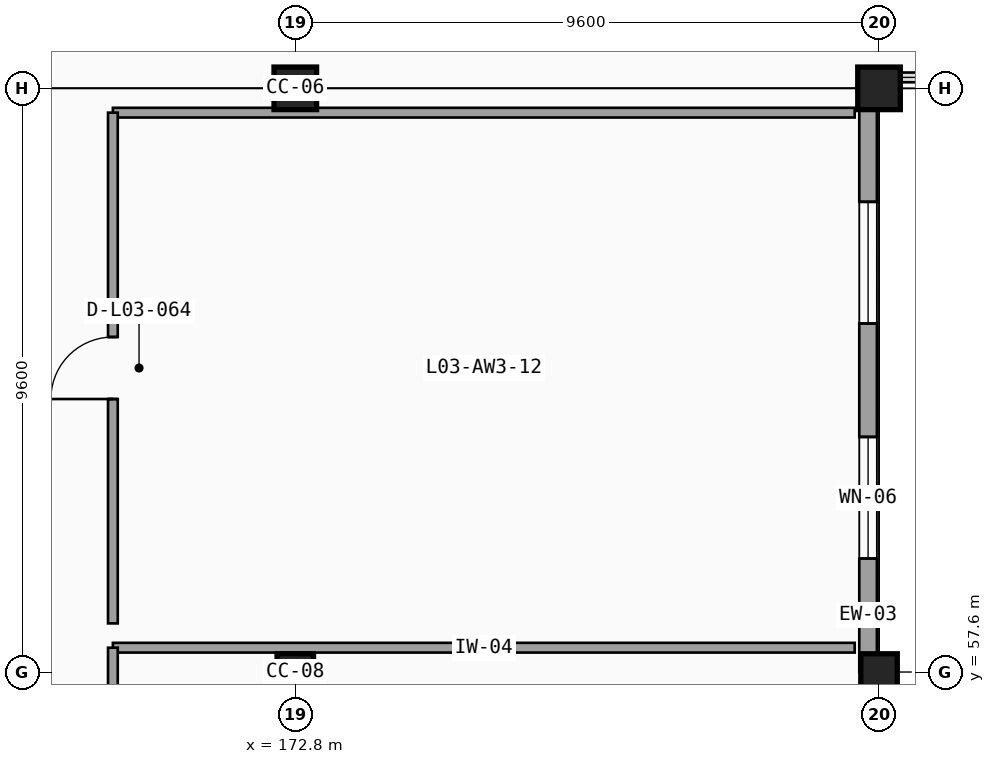
"""IFC4 building model, lengths in metres.
Left out: names, types, materials, properties, quantities, classifications, styles, units other than length and angle.
Written with IfcOpenShell. Run it as: python <this file> out.ifc"""

import sys

from ifc_helpers import new_model, si_unit, direction, frame, frame_2d, origin, origin_2d, place, context, subcontext, project, spatial, rectangle, extrude, element, fill, save


model = new_model("IFC4")
c1 = context("Model", 3, precision=1e-05, world=origin(), true_north=direction((0.0, 1.0)))
c2 = subcontext(c1, "Body", "Model", "MODEL_VIEW")
j1 = project(units=[si_unit("LENGTHUNIT", "METRE"), si_unit("PLANEANGLEUNIT", "RADIAN")], contexts=[c1])
p1 = place(None, origin())
s1 = spatial("IfcSite", under=j1, at=p1, CompositionType="ELEMENT")
p2 = place(p1, origin())
s2 = spatial("IfcBuilding", under=s1, at=p2, CompositionType="ELEMENT")
p3 = place(p2, frame((0.0, 0.0, 14.1)))
s3 = spatial("IfcBuildingStorey", under=s2, at=p3, CompositionType="ELEMENT", Elevation=14.1)
p4 = place(p3, frame((172.8, 57.6, 0.0), z_axis=(0.0, 0.0, 1.0), x_axis=(1.0, 0.0, 0.0)))
e1 = element("IfcColumn", 1, at=p4, inside=s3, PredefinedType="COLUMN", context=c2, shape_type="SweptSolid", body=[
    extrude(rectangle(XDim=0.6, YDim=0.6, at=origin_2d()), origin(), (0.0, 0.0, 1.0), 4.5),
])
p5 = place(p3, frame((172.8, 67.2, 0.0), z_axis=(0.0, 0.0, 1.0), x_axis=(1.0, 0.0, 0.0)))
e2 = element("IfcColumn", 2, at=p5, inside=s3, PredefinedType="COLUMN", context=c2, shape_type="SweptSolid", body=[
    extrude(rectangle(XDim=0.7, YDim=0.7, at=origin_2d()), origin(), (0.0, 0.0, 1.0), 4.5),
])
p6 = place(p3, frame((182.4, 57.6, 0.0), z_axis=(0.0, 0.0, 1.0), x_axis=(1.0, 0.0, 0.0)))
e3 = element("IfcColumn", 3, at=p6, inside=s3, PredefinedType="COLUMN", context=c2, shape_type="SweptSolid", body=[
    extrude(rectangle(XDim=0.6, YDim=0.6, at=origin_2d()), origin(), (0.0, 0.0, 1.0), 4.5),
])
p7 = place(p3, frame((182.4, 67.2, 0.0), z_axis=(0.0, 0.0, 1.0), x_axis=(1.0, 0.0, 0.0)))
e4 = element("IfcColumn", 4, at=p7, inside=s3, PredefinedType="COLUMN", context=c2, shape_type="SweptSolid", body=[
    extrude(rectangle(XDim=0.7, YDim=0.7, at=origin_2d()), origin(), (0.0, 0.0, 1.0), 4.5),
])
p8 = place(p3, frame((182.22, 57.6, 0.0), z_axis=(0.0, 0.0, 1.0), x_axis=(0.0, 1.0, 0.0)))
e5 = element("IfcWall", 5, at=p8, inside=s3, PredefinedType="SOLIDWALL", context=c2, shape_type="SweptSolid", body=[
    extrude(rectangle(XDim=9.6, YDim=0.29, at=frame_2d((4.8, 0.0))), origin(), (0.0, 0.0, 1.0), 3.638),
])
p9 = place(p8, frame((3.867, 0.0, 0.95), z_axis=(0.0, 0.0, 1.0), x_axis=(-1.0, 0.0, 0.0)))
e6 = element("IfcOpeningElement", 6, at=p9, cuts=e5, PredefinedType="OPENING", context=c2, shape_type="SweptSolid", body=[
    extrude(rectangle(XDim=2.0, YDim=2.0, at=frame_2d((1.0, 1.0))), frame((0.0, 0.155, 0.0), z_axis=(0.0, -1.0, 0.0), x_axis=(1.0, 0.0, 0.0)), (0.0, 0.0, 1.0), 0.31),
])
p10 = place(p8, frame((7.733, 0.0, 0.95), z_axis=(0.0, 0.0, 1.0), x_axis=(-1.0, 0.0, 0.0)))
e7 = element("IfcOpeningElement", 7, at=p10, cuts=e5, PredefinedType="OPENING", context=c2, shape_type="SweptSolid", body=[
    extrude(rectangle(XDim=2.0, YDim=2.0, at=frame_2d((1.0, 1.0))), frame((0.0, 0.155, 0.0), z_axis=(0.0, -1.0, 0.0), x_axis=(1.0, 0.0, 0.0)), (0.0, 0.0, 1.0), 0.31),
])
p11 = place(p3, frame((169.8, 58.0, 0.0), z_axis=(0.0, 0.0, 1.0), x_axis=(1.0, 0.0, 0.0)))
e8 = element("IfcWall", 8, at=p11, inside=s3, PredefinedType="PARTITIONING", context=c2, shape_type="SweptSolid", body=[
    extrude(rectangle(XDim=12.2, YDim=0.16, at=frame_2d((6.1, 0.0))), origin(), (0.0, 0.0, 1.0), 3.638),
])
p12 = place(p3, frame((169.8, 48.5, 0.0), z_axis=(0.0, 0.0, 1.0), x_axis=(0.0, 1.0, 0.0)))
e9 = element("IfcWall", 9, at=p12, inside=s3, PredefinedType="PARTITIONING", context=c2, shape_type="SweptSolid", body=[
    extrude(rectangle(XDim=9.5, YDim=0.16, at=frame_2d((4.75, 0.0))), origin(), (0.0, 0.0, 1.0), 3.556),
])
p13 = place(p12, frame((4.29, 0.0, 0.0), z_axis=(0.0, 0.0, 1.0), x_axis=(1.0, 0.0, 0.0)))
e10 = element("IfcOpeningElement", 10, at=p13, cuts=e9, PredefinedType="OPENING", context=c2, shape_type="SweptSolid", body=[
    extrude(rectangle(XDim=0.92, YDim=2.12, at=frame_2d((0.46, 1.06))), frame((0.0, 0.09, 0.0), z_axis=(0.0, -1.0, 0.0), x_axis=(1.0, 0.0, 0.0)), (0.0, 0.0, 1.0), 0.18),
])
p14 = place(p3, frame((169.8, 66.8, 0.0), z_axis=(0.0, 0.0, 1.0), x_axis=(1.0, 0.0, 0.0)))
e11 = element("IfcWall", 11, at=p14, inside=s3, PredefinedType="PARTITIONING", context=c2, shape_type="SweptSolid", body=[
    extrude(rectangle(XDim=12.2, YDim=0.16, at=frame_2d((6.1, 0.0))), origin(), (0.0, 0.0, 1.0), 3.638),
])
p15 = place(p3, frame((169.8, 58.4, 0.0), z_axis=(0.0, 0.0, 1.0), x_axis=(0.0, 1.0, 0.0)))
e12 = element("IfcWall", 12, at=p15, inside=s3, PredefinedType="PARTITIONING", context=c2, shape_type="SweptSolid", body=[
    extrude(rectangle(XDim=8.4, YDim=0.16, at=frame_2d((4.2, 0.0))), origin(), (0.0, 0.0, 1.0), 3.833),
])
p16 = place(p15, frame((3.69, 0.0, 0.0), z_axis=(0.0, 0.0, 1.0), x_axis=(1.0, 0.0, 0.0)))
e13 = element("IfcOpeningElement", 13, at=p16, cuts=e12, PredefinedType="OPENING", context=c2, shape_type="SweptSolid", body=[
    extrude(rectangle(XDim=1.02, YDim=2.15, at=frame_2d((0.51, 1.075))), frame((0.0, 0.09, 0.0), z_axis=(0.0, -1.0, 0.0), x_axis=(1.0, 0.0, 0.0)), (0.0, 0.0, 1.0), 0.18),
])
p17 = place(p9, origin())
e14 = element("IfcWindow", 14, at=p17, inside=s3, PartitioningType="SINGLE_PANEL", PredefinedType="WINDOW", context=c2, shape_type="SweptSolid", body=[
    extrude(rectangle(XDim=2.0, YDim=2.0, at=frame_2d((1.0, 1.0))), frame((0.0, 0.03, 0.0), z_axis=(0.0, -1.0, 0.0), x_axis=(1.0, 0.0, 0.0)), (0.0, 0.0, 1.0), 0.06),
])
fill(e6, e14)
p18 = place(p10, origin())
e15 = element("IfcWindow", 15, at=p18, inside=s3, PartitioningType="SINGLE_PANEL", PredefinedType="WINDOW", context=c2, shape_type="SweptSolid", body=[
    extrude(rectangle(XDim=2.0, YDim=2.0, at=frame_2d((1.0, 1.0))), frame((0.0, 0.03, 0.0), z_axis=(0.0, -1.0, 0.0), x_axis=(1.0, 0.0, 0.0)), (0.0, 0.0, 1.0), 0.06),
])
fill(e7, e15)
p19 = place(p16, origin())
e16 = element("IfcDoor", 16, at=p19, inside=s3, OperationType="SINGLE_SWING_LEFT", PredefinedType="DOOR", context=c2, shape_type="SweptSolid", body=[
    extrude(rectangle(XDim=1.02, YDim=2.15, at=frame_2d((0.51, 1.075))), frame((0.0, 0.025, 0.0), z_axis=(0.0, -1.0, 0.0), x_axis=(1.0, 0.0, 0.0)), (0.0, 0.0, 1.0), 0.05),
])
fill(e13, e16)
save(model, sys.argv[1])
